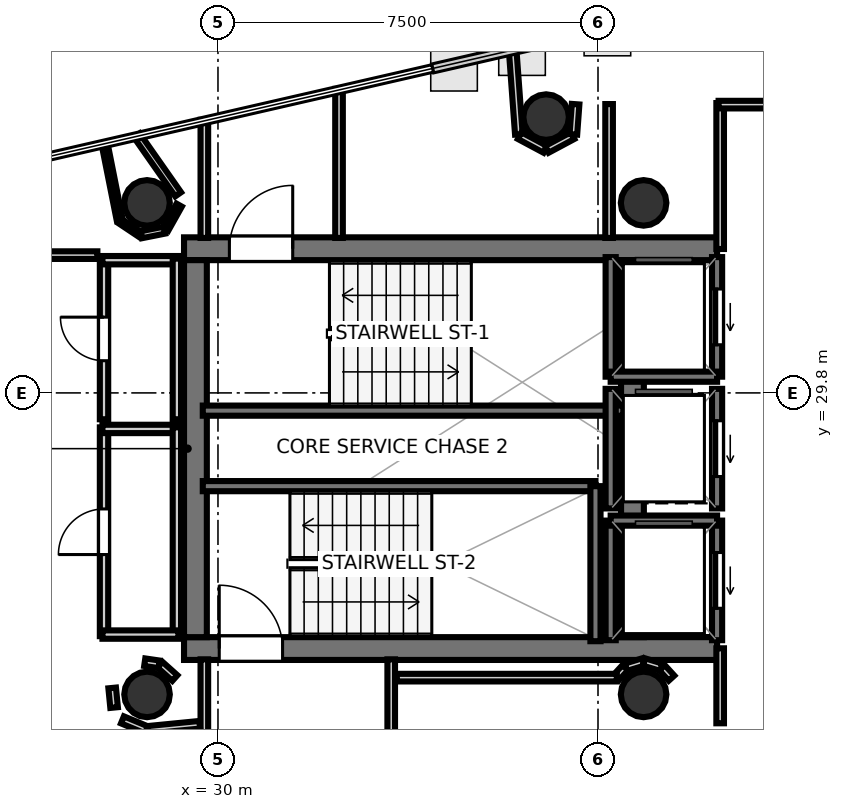
"""IFC4 building model, lengths in metres.
Left out: names, types, materials, properties, quantities, classifications, styles, units other than length and angle.
Written with IfcOpenShell. Run it as: python <this file> out.ifc"""

import sys

from ifc_helpers import new_model, si_unit, direction, frame, frame_2d, origin, origin_2d, place, context, subcontext, project, spatial, rectangle, hollow_circle, extrude, element, fill, save


model = new_model("IFC4")
c1 = context("Model", 3, precision=1e-05, world=origin(), true_north=direction((0.0, 1.0)))
c2 = subcontext(c1, "Body", "Model", "MODEL_VIEW")
j1 = project(units=[si_unit("LENGTHUNIT", "METRE"), si_unit("PLANEANGLEUNIT", "RADIAN")], contexts=[c1])
p1 = place(None, origin())
s1 = spatial("IfcSite", under=j1, at=p1, CompositionType="ELEMENT")
p2 = place(p1, origin())
s2 = spatial("IfcBuilding", under=s1, at=p2, CompositionType="ELEMENT")
p3 = place(p2, frame((0.0, 0.0, 306.5)))
s3 = spatial("IfcBuildingStorey", under=s2, at=p3, CompositionType="ELEMENT", Elevation=306.5)
p4 = place(p3, frame((29.33, 32.645, 0.0), z_axis=(0.0, 0.0, 1.0), x_axis=(1.0, 0.0, 0.0)))
e1 = element("IfcWall", 1, at=p4, inside=s3, PredefinedType="SHEAR", context=c2, shape_type="SweptSolid", body=[
    extrude(rectangle(XDim=10.52, YDim=0.45, at=frame_2d((5.26, 0.0))), origin(), (0.0, 0.0, 1.0), 3.52),
])
p5 = place(p4, frame((0.895, 0.0, 0.0)))
e2 = element("IfcOpeningElement", 2, at=p5, cuts=e1, PredefinedType="OPENING", context=c2, shape_type="SweptSolid", body=[
    extrude(rectangle(XDim=1.25, YDim=2.15, at=frame_2d((0.625, 1.075))), frame((0.0, 0.235, 0.0), z_axis=(0.0, -1.0, 0.0), x_axis=(1.0, 0.0, 0.0)), (0.0, 0.0, 1.0), 0.47),
])
p6 = place(p3, frame((29.33, 24.755, 0.0), z_axis=(0.0, 0.0, 1.0), x_axis=(1.0, 0.0, 0.0)))
e3 = element("IfcWall", 3, at=p6, inside=s3, PredefinedType="SHEAR", context=c2, shape_type="SweptSolid", body=[
    extrude(rectangle(XDim=10.52, YDim=0.45, at=frame_2d((5.26, 0.0))), origin(), (0.0, 0.0, 1.0), 3.52),
])
p7 = place(p6, frame((0.695, 0.0, 0.0)))
e4 = element("IfcOpeningElement", 4, at=p7, cuts=e3, PredefinedType="OPENING", context=c2, shape_type="SweptSolid", body=[
    extrude(rectangle(XDim=1.25, YDim=2.15, at=frame_2d((0.625, 1.075))), frame((0.0, 0.235, 0.0), z_axis=(0.0, -1.0, 0.0), x_axis=(1.0, 0.0, 0.0)), (0.0, 0.0, 1.0), 0.47),
])
for number, where, z_axis, x_axis in (
    (5, (29.555, 24.98, 0.0), (0.0, 0.0, 1.0), (0.0, 1.0, 0.0)),
    (6, (38.18, 24.98, 0.0), (0.0, 0.0, 1.0), (0.0, 1.0, 0.0)),
):
    element("IfcWall", number, at=place(p3, frame(where, z_axis=z_axis, x_axis=x_axis)), inside=s3, PredefinedType="SHEAR", context=c2, shape_type="SweptSolid", body=[
        extrude(rectangle(XDim=7.44, YDim=0.45, at=frame_2d((3.72, 0.0))), origin(), (0.0, 0.0, 1.0), 3.52),
    ])
for number, where, z_axis, x_axis in (
    (7, (28.6, 33.55, 0.0), (0.0, 0.0, 1.0), (1.0, 0.0, 0.0)),
    (8, (28.6, 23.85, 0.0), (0.0, 0.0, 1.0), (1.0, 0.0, 0.0)),
    (9, (38.4, 33.55, 0.0), (0.0, 0.0, 1.0), (1.0, 0.0, 0.0)),
    (10, (38.4, 23.85, 0.0), (0.0, 0.0, 1.0), (1.0, 0.0, 0.0)),
    (11, (36.476, 35.243, 0.0), (0.0, 0.0, 1.0), (1.0, 0.0, 0.0)),
):
    element("IfcColumn", number, at=place(p3, frame(where, z_axis=z_axis, x_axis=x_axis)), inside=s3, PredefinedType="COLUMN", context=c2, shape_type="SweptSolid", body=[
        extrude(hollow_circle(Radius=0.45, WallThickness=0.025, at=origin_2d()), origin(), (0.0, 0.0, 1.0), 3.7),
    ])
p8 = place(p3, frame((29.7, 29.45, 0.0), z_axis=(0.0, 0.0, 1.0), x_axis=(1.0, 0.0, 0.0)))
e12 = element("IfcWall", 12, at=p8, inside=s3, PredefinedType="SOLIDWALL", context=c2, shape_type="SweptSolid", body=[
    extrude(rectangle(XDim=8.3, YDim=0.2, at=frame_2d((4.15, 0.0))), origin(), (0.0, 0.0, 1.0), 3.52),
])
p9 = place(p3, frame((29.7, 27.96, 0.0), z_axis=(0.0, 0.0, 1.0), x_axis=(1.0, 0.0, 0.0)))
e13 = element("IfcWall", 13, at=p9, inside=s3, PredefinedType="SOLIDWALL", context=c2, shape_type="SweptSolid", body=[
    extrude(rectangle(XDim=7.75, YDim=0.2, at=frame_2d((3.875, 0.0))), origin(), (0.0, 0.0, 1.0), 3.52),
])
p10 = place(p3, frame((37.45, 24.9, 0.0), z_axis=(0.0, 0.0, 1.0), x_axis=(0.0, 1.0, 0.0)))
e14 = element("IfcWall", 14, at=p10, inside=s3, PredefinedType="SOLIDWALL", context=c2, shape_type="SweptSolid", body=[
    extrude(rectangle(XDim=3.06, YDim=0.2, at=frame_2d((1.53, 0.0))), origin(), (0.0, 0.0, 1.0), 3.52),
])
p11 = place(p3, frame((39.85, 30.12, 0.0), z_axis=(0.0, 0.0, 1.0), x_axis=(0.0, 1.0, 0.0)))
e15 = element("IfcWall", 15, at=p11, inside=s3, PredefinedType="SOLIDWALL", context=c2, shape_type="SweptSolid", body=[
    extrude(rectangle(XDim=2.36, YDim=0.2, at=frame_2d((1.18, 0.0))), origin(), (0.0, 0.0, 1.0), 3.52),
])
p12 = place(p11, frame((0.63, 0.0, 0.0)))
e16 = element("IfcOpeningElement", 16, at=p12, cuts=e15, PredefinedType="OPENING", context=c2, shape_type="SweptSolid", body=[
    extrude(rectangle(XDim=1.1, YDim=2.15, at=frame_2d((0.55, 1.075))), frame((0.0, 0.11, 0.0), z_axis=(0.0, -1.0, 0.0), x_axis=(1.0, 0.0, 0.0)), (0.0, 0.0, 1.0), 0.22),
])
p13 = place(p3, frame((37.75, 30.12, 0.0), z_axis=(0.0, 0.0, 1.0), x_axis=(0.0, 1.0, 0.0)))
e17 = element("IfcWall", 17, at=p13, inside=s3, PredefinedType="SOLIDWALL", context=c2, shape_type="SweptSolid", body=[
    extrude(rectangle(XDim=2.36, YDim=0.2, at=frame_2d((1.18, 0.0))), origin(), (0.0, 0.0, 1.0), 3.52),
])
p14 = place(p3, frame((37.75, 30.12, 0.0), z_axis=(0.0, 0.0, 1.0), x_axis=(1.0, 0.0, 0.0)))
e18 = element("IfcWall", 18, at=p14, inside=s3, PredefinedType="SOLIDWALL", context=c2, shape_type="SweptSolid", body=[
    extrude(rectangle(XDim=2.1, YDim=0.2, at=frame_2d((1.05, 0.0))), origin(), (0.0, 0.0, 1.0), 3.52),
])
p15 = place(p3, frame((39.85, 24.92, 0.0), z_axis=(0.0, 0.0, 1.0), x_axis=(0.0, 1.0, 0.0)))
e19 = element("IfcWall", 19, at=p15, inside=s3, PredefinedType="SOLIDWALL", context=c2, shape_type="SweptSolid", body=[
    extrude(rectangle(XDim=2.36, YDim=0.2, at=frame_2d((1.18, 0.0))), origin(), (0.0, 0.0, 1.0), 3.52),
])
p16 = place(p15, frame((0.63, 0.0, 0.0)))
e20 = element("IfcOpeningElement", 20, at=p16, cuts=e19, PredefinedType="OPENING", context=c2, shape_type="SweptSolid", body=[
    extrude(rectangle(XDim=1.1, YDim=2.15, at=frame_2d((0.55, 1.075))), frame((0.0, 0.11, 0.0), z_axis=(0.0, -1.0, 0.0), x_axis=(1.0, 0.0, 0.0)), (0.0, 0.0, 1.0), 0.22),
])
p17 = place(p3, frame((37.75, 24.92, 0.0), z_axis=(0.0, 0.0, 1.0), x_axis=(0.0, 1.0, 0.0)))
e21 = element("IfcWall", 21, at=p17, inside=s3, PredefinedType="SOLIDWALL", context=c2, shape_type="SweptSolid", body=[
    extrude(rectangle(XDim=2.36, YDim=0.2, at=frame_2d((1.18, 0.0))), origin(), (0.0, 0.0, 1.0), 3.52),
])
p18 = place(p3, frame((37.75, 27.28, 0.0), z_axis=(0.0, 0.0, 1.0), x_axis=(1.0, 0.0, 0.0)))
e22 = element("IfcWall", 22, at=p18, inside=s3, PredefinedType="SOLIDWALL", context=c2, shape_type="SweptSolid", body=[
    extrude(rectangle(XDim=2.1, YDim=0.2, at=frame_2d((1.05, 0.0))), origin(), (0.0, 0.0, 1.0), 3.52),
])
p19 = place(p3, frame((39.85, 27.52, 0.0), z_axis=(0.0, 0.0, 1.0), x_axis=(0.0, 1.0, 0.0)))
e23 = element("IfcWall", 23, at=p19, inside=s3, PredefinedType="SOLIDWALL", context=c2, shape_type="SweptSolid", body=[
    extrude(rectangle(XDim=2.36, YDim=0.2, at=frame_2d((1.18, 0.0))), origin(), (0.0, 0.0, 1.0), 3.52),
])
p20 = place(p19, frame((0.63, 0.0, 0.0)))
e24 = element("IfcOpeningElement", 24, at=p20, cuts=e23, PredefinedType="OPENING", context=c2, shape_type="SweptSolid", body=[
    extrude(rectangle(XDim=1.1, YDim=2.15, at=frame_2d((0.55, 1.075))), frame((0.0, 0.11, 0.0), z_axis=(0.0, -1.0, 0.0), x_axis=(1.0, 0.0, 0.0)), (0.0, 0.0, 1.0), 0.22),
])
p21 = place(p3, frame((37.75, 27.52, 0.0), z_axis=(0.0, 0.0, 1.0), x_axis=(0.0, 1.0, 0.0)))
e25 = element("IfcWall", 25, at=p21, inside=s3, PredefinedType="SOLIDWALL", context=c2, shape_type="SweptSolid", body=[
    extrude(rectangle(XDim=2.36, YDim=0.2, at=frame_2d((1.18, 0.0))), origin(), (0.0, 0.0, 1.0), 3.52),
])
p22 = place(p3, frame((29.731, 32.858, 0.0), z_axis=(0.0, 0.0, 1.0), x_axis=(0.0, 1.0, 0.0)))
e26 = element("IfcWall", 26, at=p22, inside=s3, PredefinedType="PARTITIONING", context=c2, shape_type="SweptSolid", body=[
    extrude(rectangle(XDim=2.331, YDim=0.15, at=frame_2d((1.166, 0.0))), origin(), (0.0, 0.0, 1.0), 2.84),
])
p23 = place(p3, frame((32.389, 35.799, 0.0), z_axis=(0.0, 0.0, 1.0), x_axis=(0.0, -1.0, 0.0)))
e27 = element("IfcWall", 27, at=p23, inside=s3, PredefinedType="PARTITIONING", context=c2, shape_type="SweptSolid", body=[
    extrude(rectangle(XDim=2.941, YDim=0.15, at=frame_2d((1.47, 0.0))), origin(), (0.0, 0.0, 1.0), 2.84),
])
for number, where, z_axis, x_axis in (
    (28, (29.731, 21.85, 0.0), (0.0, 0.0, 1.0), (0.0, 1.0, 0.0)),
    (29, (33.419, 24.542, 0.0), (0.0, 0.0, 1.0), (0.0, -1.0, 0.0)),
):
    element("IfcWall", number, at=place(p3, frame(where, z_axis=z_axis, x_axis=x_axis)), inside=s3, PredefinedType="PARTITIONING", context=c2, shape_type="SweptSolid", body=[
        extrude(rectangle(XDim=2.692, YDim=0.15, at=frame_2d((1.346, 0.0))), origin(), (0.0, 0.0, 1.0), 2.84),
    ])
p24 = place(p3, frame((39.911, 23.28, 0.0), z_axis=(0.0, 0.0, 1.0), x_axis=(0.0, 1.0, 0.0)))
e30 = element("IfcWall", 30, at=p24, inside=s3, PredefinedType="PARTITIONING", context=c2, shape_type="SweptSolid", body=[
    extrude(rectangle(XDim=1.48, YDim=0.15, at=frame_2d((0.74, 0.0))), origin(), (0.0, 0.0, 1.0), 2.84),
])
p25 = place(p3, frame((39.911, 32.64, 0.0), z_axis=(0.0, 0.0, 1.0), x_axis=(0.0, 1.0, 0.0)))
e31 = element("IfcWall", 31, at=p25, inside=s3, PredefinedType="PARTITIONING", context=c2, shape_type="SweptSolid", body=[
    extrude(rectangle(XDim=2.88, YDim=0.15, at=frame_2d((1.44, 0.0))), origin(), (0.0, 0.0, 1.0), 2.84),
])
p26 = place(p3, frame((39.88, 35.489, 0.0), z_axis=(0.0, 0.0, 1.0), x_axis=(1.0, 0.0, 0.0)))
e32 = element("IfcWall", 32, at=p26, inside=s3, PredefinedType="PARTITIONING", context=c2, shape_type="SweptSolid", body=[
    extrude(rectangle(XDim=1.48, YDim=0.15, at=frame_2d((0.74, 0.0))), origin(), (0.0, 0.0, 1.0), 2.84),
])
p27 = place(p3, frame((27.751, 25.0, 0.0), z_axis=(0.0, 0.0, 1.0), x_axis=(0.0, 1.0, 0.0)))
e33 = element("IfcWall", 33, at=p27, inside=s3, PredefinedType="PLUMBINGWALL", context=c2, shape_type="SweptSolid", body=[
    extrude(rectangle(XDim=4.12, YDim=0.165, at=frame_2d((2.06, 0.0))), origin(), (0.0, 0.0, 1.0), 2.84),
])
p28 = place(p27, frame((1.61, 0.0, 0.0)))
e34 = element("IfcOpeningElement", 34, at=p28, cuts=e33, PredefinedType="OPENING", context=c2, shape_type="SweptSolid", body=[
    extrude(rectangle(XDim=0.9, YDim=2.1, at=frame_2d((0.45, 1.05))), frame((0.0, 0.093, 0.0), z_axis=(0.0, -1.0, 0.0), x_axis=(1.0, 0.0, 0.0)), (0.0, 0.0, 1.0), 0.185),
])
p29 = place(p3, frame((27.72, 29.089, 0.0), z_axis=(0.0, 0.0, 1.0), x_axis=(1.0, 0.0, 0.0)))
e35 = element("IfcWall", 35, at=p29, inside=s3, PredefinedType="PLUMBINGWALL", context=c2, shape_type="SweptSolid", body=[
    extrude(rectangle(XDim=1.5, YDim=0.165, at=frame_2d((0.75, 0.0))), origin(), (0.0, 0.0, 1.0), 2.84),
])
p30 = place(p3, frame((29.189, 29.12, 0.0), z_axis=(0.0, 0.0, 1.0), x_axis=(0.0, -1.0, 0.0)))
e36 = element("IfcWall", 36, at=p30, inside=s3, PredefinedType="PLUMBINGWALL", context=c2, shape_type="SweptSolid", body=[
    extrude(rectangle(XDim=4.12, YDim=0.165, at=frame_2d((2.06, 0.0))), origin(), (0.0, 0.0, 1.0), 2.84),
])
p31 = place(p3, frame((29.22, 25.031, 0.0), z_axis=(0.0, 0.0, 1.0), x_axis=(-1.0, 0.0, 0.0)))
e37 = element("IfcWall", 37, at=p31, inside=s3, PredefinedType="PLUMBINGWALL", context=c2, shape_type="SweptSolid", body=[
    extrude(rectangle(XDim=1.5, YDim=0.165, at=frame_2d((0.75, 0.0))), origin(), (0.0, 0.0, 1.0), 2.84),
])
p32 = place(p3, frame((27.751, 29.28, 0.0), z_axis=(0.0, 0.0, 1.0), x_axis=(0.0, 1.0, 0.0)))
e38 = element("IfcWall", 38, at=p32, inside=s3, PredefinedType="PLUMBINGWALL", context=c2, shape_type="SweptSolid", body=[
    extrude(rectangle(XDim=3.17, YDim=0.165, at=frame_2d((1.585, 0.0))), origin(), (0.0, 0.0, 1.0), 2.84),
])
p33 = place(p32, frame((1.155, 0.0, 0.0)))
e39 = element("IfcOpeningElement", 39, at=p33, cuts=e38, PredefinedType="OPENING", context=c2, shape_type="SweptSolid", body=[
    extrude(rectangle(XDim=0.86, YDim=2.05, at=frame_2d((0.43, 1.025))), frame((0.0, 0.093, 0.0), z_axis=(0.0, -1.0, 0.0), x_axis=(1.0, 0.0, 0.0)), (0.0, 0.0, 1.0), 0.185),
])
p34 = place(p3, frame((27.72, 32.419, 0.0), z_axis=(0.0, 0.0, 1.0), x_axis=(1.0, 0.0, 0.0)))
e40 = element("IfcWall", 40, at=p34, inside=s3, PredefinedType="PLUMBINGWALL", context=c2, shape_type="SweptSolid", body=[
    extrude(rectangle(XDim=1.5, YDim=0.165, at=frame_2d((0.75, 0.0))), origin(), (0.0, 0.0, 1.0), 2.84),
])
p35 = place(p3, frame((29.189, 32.45, 0.0), z_axis=(0.0, 0.0, 1.0), x_axis=(0.0, -1.0, 0.0)))
e41 = element("IfcWall", 41, at=p35, inside=s3, PredefinedType="PLUMBINGWALL", context=c2, shape_type="SweptSolid", body=[
    extrude(rectangle(XDim=3.17, YDim=0.165, at=frame_2d((1.585, 0.0))), origin(), (0.0, 0.0, 1.0), 2.84),
])
p36 = place(p3, frame((38.951, 24.171, 0.0), z_axis=(0.0, 0.0, 1.0), x_axis=(-0.674186852077, 0.738560822469, 0.0)))
e42 = element("IfcWall", 42, at=p36, inside=s3, PredefinedType="PARTITIONING", context=c2, shape_type="SweptSolid", body=[
    extrude(rectangle(XDim=0.281, YDim=0.15, at=frame_2d((0.14, 0.0))), origin(), (0.0, 0.0, 1.0), 2.84),
])
p37 = place(p3, frame((38.748, 24.387, 0.0), z_axis=(0.0, 0.0, 1.0), x_axis=(-0.956948991291, 0.290256142171, 0.0)))
e43 = element("IfcWall", 43, at=p37, inside=s3, PredefinedType="PARTITIONING", context=c2, shape_type="SweptSolid", body=[
    extrude(rectangle(XDim=0.354, YDim=0.15, at=frame_2d((0.177, 0.0))), origin(), (0.0, 0.0, 1.0), 2.84),
])
p38 = place(p3, frame((38.391, 24.49, 0.0), z_axis=(0.0, 0.0, 1.0), x_axis=(-0.957007018611, -0.290064762301, 0.0)))
e44 = element("IfcWall", 44, at=p38, inside=s3, PredefinedType="PARTITIONING", context=c2, shape_type="SweptSolid", body=[
    extrude(rectangle(XDim=0.354, YDim=0.15, at=frame_2d((0.177, 0.0))), origin(), (0.0, 0.0, 1.0), 2.84),
])
p39 = place(p3, frame((38.038, 24.378, 0.0), z_axis=(0.0, 0.0, 1.0), x_axis=(-0.673658387955, -0.739042878551, 0.0)))
e45 = element("IfcWall", 45, at=p39, inside=s3, PredefinedType="PARTITIONING", context=c2, shape_type="SweptSolid", body=[
    extrude(rectangle(XDim=0.246, YDim=0.15, at=frame_2d((0.123, 0.0))), origin(), (0.0, 0.0, 1.0), 2.84),
])
p40 = place(p3, frame((37.872, 24.181, 0.0), z_axis=(0.0, 0.0, 1.0), x_axis=(-1.0, 0.0, 0.0)))
e46 = element("IfcWall", 46, at=p40, inside=s3, PredefinedType="PARTITIONING", context=c2, shape_type="SweptSolid", body=[
    extrude(rectangle(XDim=4.342, YDim=0.15, at=frame_2d((2.171, 0.0))), origin(), (0.0, 0.0, 1.0), 2.84),
])
p41 = place(p3, frame((29.149, 24.173, 0.0), z_axis=(0.0, 0.0, 1.0), x_axis=(-0.745225165416, 0.666812906917, 0.0)))
e47 = element("IfcWall", 47, at=p41, inside=s3, PredefinedType="PARTITIONING", context=c2, shape_type="SweptSolid", body=[
    extrude(rectangle(XDim=0.396, YDim=0.15, at=frame_2d((0.198, 0.0))), origin(), (0.0, 0.0, 1.0), 2.84),
])
p42 = place(p3, frame((28.838, 24.444, 0.0), z_axis=(0.0, 0.0, 1.0), x_axis=(-0.989449148305, 0.144880581578, 0.0)))
e48 = element("IfcWall", 48, at=p42, inside=s3, PredefinedType="PARTITIONING", context=c2, shape_type="SweptSolid", body=[
    extrude(rectangle(XDim=0.286, YDim=0.15, at=frame_2d((0.143, 0.0))), origin(), (0.0, 0.0, 1.0), 2.84),
])
p43 = place(p3, frame((35.814, 36.585, 0.0), z_axis=(0.0, 0.0, 1.0), x_axis=(0.073333558688, -0.997307469725, 0.0)))
e49 = element("IfcWall", 49, at=p43, inside=s3, PredefinedType="PARTITIONING", context=c2, shape_type="SweptSolid", body=[
    extrude(rectangle(XDim=1.688, YDim=0.15, at=frame_2d((0.844, 0.0))), origin(), (0.0, 0.0, 1.0), 2.84),
])
for number, where, z_axis, x_axis in (
    (50, (35.954, 34.877, 0.0), (0.0, 0.0, 1.0), (0.882, -0.471, 0.0)),
    (51, (36.49, 34.606, 0.0), (0.0, 0.0, 1.0), (0.882, 0.471, 0.0)),
):
    element("IfcWall", number, at=place(p3, frame(where, z_axis=z_axis, x_axis=x_axis)), inside=s3, PredefinedType="PARTITIONING", context=c2, shape_type="SweptSolid", body=[
        extrude(rectangle(XDim=0.575, YDim=0.15, at=frame_2d((0.288, 0.0))), origin(), (0.0, 0.0, 1.0), 2.84),
    ])
p44 = place(p3, frame((37.014, 34.902, 0.0), z_axis=(0.0, 0.0, 1.0), x_axis=(0.073134230676, 0.997322106595, 0.0)))
e52 = element("IfcWall", 52, at=p44, inside=s3, PredefinedType="PARTITIONING", context=c2, shape_type="SweptSolid", body=[
    extrude(rectangle(XDim=0.598, YDim=0.15, at=frame_2d((0.299, 0.0))), origin(), (0.0, 0.0, 1.0), 2.84),
])
p45 = place(p3, frame((37.719, 35.5, 0.0), z_axis=(0.0, 0.0, 1.0), x_axis=(0.0, -1.0, 0.0)))
e53 = element("IfcWall", 53, at=p45, inside=s3, PredefinedType="PARTITIONING", context=c2, shape_type="SweptSolid", body=[
    extrude(rectangle(XDim=2.642, YDim=0.15, at=frame_2d((1.321, 0.0))), origin(), (0.0, 0.0, 1.0), 2.84),
])
p46 = place(p3, frame((25.65, 32.519, 0.0), z_axis=(0.0, 0.0, 1.0), x_axis=(1.0, 0.0, 0.0)))
e54 = element("IfcWall", 54, at=p46, inside=s3, PredefinedType="PARTITIONING", context=c2, shape_type="SweptSolid", body=[
    extrude(rectangle(XDim=1.97, YDim=0.15, at=frame_2d((0.985, 0.0))), origin(), (0.0, 0.0, 1.0), 2.84),
])
p47 = place(p3, frame((27.912, 23.978, 0.0), z_axis=(0.0, 0.0, 1.0), x_axis=(0.097888269922, -0.995197410875, 0.0)))
e55 = element("IfcWall", 55, at=p47, inside=s3, PredefinedType="PARTITIONING", context=c2, shape_type="SweptSolid", body=[
    extrude(rectangle(XDim=0.389, YDim=0.15, at=frame_2d((0.195, 0.0))), origin(), (0.0, 0.0, 1.0), 2.84),
])
p48 = place(p3, frame((28.115, 23.348, 0.0), z_axis=(0.0, 0.0, 1.0), x_axis=(0.923807847969, -0.382856448334, 0.0)))
e56 = element("IfcWall", 56, at=p48, inside=s3, PredefinedType="PARTITIONING", context=c2, shape_type="SweptSolid", body=[
    extrude(rectangle(XDim=0.513, YDim=0.15, at=frame_2d((0.256, 0.0))), origin(), (0.0, 0.0, 1.0), 2.84),
])
p49 = place(p3, frame((28.603, 23.149, 0.0), z_axis=(0.0, 0.0, 1.0), x_axis=(0.995179827095, 0.098066873836, 0.0)))
e57 = element("IfcWall", 57, at=p49, inside=s3, PredefinedType="PARTITIONING", context=c2, shape_type="SweptSolid", body=[
    extrude(rectangle(XDim=1.043, YDim=0.15, at=frame_2d((0.521, 0.0))), origin(), (0.0, 0.0, 1.0), 2.84),
])
p50 = place(p3, frame((29.214, 33.719, 0.0), z_axis=(0.0, 0.0, 1.0), x_axis=(-0.573981241373, 0.818868447647, 0.0)))
e58 = element("IfcWall", 58, at=p50, inside=s3, PredefinedType="PARTITIONING", context=c2, shape_type="SweptSolid", body=[
    extrude(rectangle(XDim=1.421, YDim=0.14, at=frame_2d((0.71, 0.0))), origin(), (0.0, 0.0, 1.0), 2.84),
])
p51 = place(p3, frame((27.758, 34.736, 0.0), z_axis=(0.0, 0.0, 1.0), x_axis=(0.195153744134, -0.980772662828, 0.0)))
e59 = element("IfcWall", 59, at=p51, inside=s3, PredefinedType="PARTITIONING", context=c2, shape_type="SweptSolid", body=[
    extrude(rectangle(XDim=1.561, YDim=0.12, at=frame_2d((0.781, 0.0))), origin(), (0.0, 0.0, 1.0), 2.84),
])
p52 = place(p3, frame((28.076, 33.185, 0.0), z_axis=(0.0, 0.0, 1.0), x_axis=(0.831325644669, -0.555785635398, 0.0)))
e60 = element("IfcWall", 60, at=p52, inside=s3, PredefinedType="PARTITIONING", context=c2, shape_type="SweptSolid", body=[
    extrude(rectangle(XDim=0.467, YDim=0.105, at=frame_2d((0.233, 0.0))), origin(), (0.0, 0.0, 1.0), 2.84),
])
p53 = place(p3, frame((28.487, 32.921, 0.0), z_axis=(0.0, 0.0, 1.0), x_axis=(0.980781345641, 0.19511010236, 0.0)))
e61 = element("IfcWall", 61, at=p53, inside=s3, PredefinedType="PARTITIONING", context=c2, shape_type="SweptSolid", body=[
    extrude(rectangle(XDim=0.467, YDim=0.14, at=frame_2d((0.233, 0.0))), origin(), (0.0, 0.0, 1.0), 2.84),
])
p54 = place(p3, frame((28.966, 33.028, 0.0), z_axis=(0.0, 0.0, 1.0), x_axis=(0.489267492682, 0.872133774489, 0.0)))
e62 = element("IfcWall", 62, at=p54, inside=s3, PredefinedType="PARTITIONING", context=c2, shape_type="SweptSolid", body=[
    extrude(rectangle(XDim=0.548, YDim=0.12, at=frame_2d((0.274, 0.0))), origin(), (0.0, 0.0, 1.0), 2.84),
])
p55 = place(p5, origin())
e63 = element("IfcDoor", 63, at=p55, inside=s3, OperationType="SINGLE_SWING_RIGHT", PredefinedType="DOOR", context=c2, shape_type="SweptSolid", body=[
    extrude(rectangle(XDim=1.25, YDim=2.15, at=frame_2d((0.625, 1.075))), frame((0.0, 0.025, 0.0), z_axis=(0.0, -1.0, 0.0), x_axis=(1.0, 0.0, 0.0)), (0.0, 0.0, 1.0), 0.05),
])
fill(e2, e63)
p56 = place(p7, origin())
e64 = element("IfcDoor", 64, at=p56, inside=s3, OperationType="SINGLE_SWING_LEFT", PredefinedType="DOOR", context=c2, shape_type="SweptSolid", body=[
    extrude(rectangle(XDim=1.25, YDim=2.15, at=frame_2d((0.625, 1.075))), frame((0.0, 0.025, 0.0), z_axis=(0.0, -1.0, 0.0), x_axis=(1.0, 0.0, 0.0)), (0.0, 0.0, 1.0), 0.05),
])
fill(e4, e64)
p57 = place(p12, origin())
e65 = element("IfcDoor", 65, at=p57, inside=s3, OperationType="SLIDING_TO_LEFT", PredefinedType="DOOR", context=c2, shape_type="SweptSolid", body=[
    extrude(rectangle(XDim=1.1, YDim=2.15, at=frame_2d((0.55, 1.075))), frame((0.0, 0.025, 0.0), z_axis=(0.0, -1.0, 0.0), x_axis=(1.0, 0.0, 0.0)), (0.0, 0.0, 1.0), 0.05),
])
fill(e16, e65)
p58 = place(p16, origin())
e66 = element("IfcDoor", 66, at=p58, inside=s3, OperationType="SLIDING_TO_LEFT", PredefinedType="DOOR", context=c2, shape_type="SweptSolid", body=[
    extrude(rectangle(XDim=1.1, YDim=2.15, at=frame_2d((0.55, 1.075))), frame((0.0, 0.025, 0.0), z_axis=(0.0, -1.0, 0.0), x_axis=(1.0, 0.0, 0.0)), (0.0, 0.0, 1.0), 0.05),
])
fill(e20, e66)
p59 = place(p20, origin())
e67 = element("IfcDoor", 67, at=p59, inside=s3, OperationType="SLIDING_TO_LEFT", PredefinedType="DOOR", context=c2, shape_type="SweptSolid", body=[
    extrude(rectangle(XDim=1.1, YDim=2.15, at=frame_2d((0.55, 1.075))), frame((0.0, 0.025, 0.0), z_axis=(0.0, -1.0, 0.0), x_axis=(1.0, 0.0, 0.0)), (0.0, 0.0, 1.0), 0.05),
])
fill(e24, e67)
p60 = place(p28, origin())
e68 = element("IfcDoor", 68, at=p60, inside=s3, OperationType="SINGLE_SWING_LEFT", PredefinedType="DOOR", context=c2, shape_type="SweptSolid", body=[
    extrude(rectangle(XDim=0.9, YDim=2.1, at=frame_2d((0.45, 1.05))), frame((0.0, 0.025, 0.0), z_axis=(0.0, -1.0, 0.0), x_axis=(1.0, 0.0, 0.0)), (0.0, 0.0, 1.0), 0.05),
])
fill(e34, e68)
p61 = place(p33, origin())
e69 = element("IfcDoor", 69, at=p61, inside=s3, OperationType="SINGLE_SWING_RIGHT", PredefinedType="DOOR", context=c2, shape_type="SweptSolid", body=[
    extrude(rectangle(XDim=0.86, YDim=2.05, at=frame_2d((0.43, 1.025))), frame((0.0, 0.025, 0.0), z_axis=(0.0, -1.0, 0.0), x_axis=(1.0, 0.0, 0.0)), (0.0, 0.0, 1.0), 0.05),
])
fill(e39, e69)
save(model, sys.argv[1])
